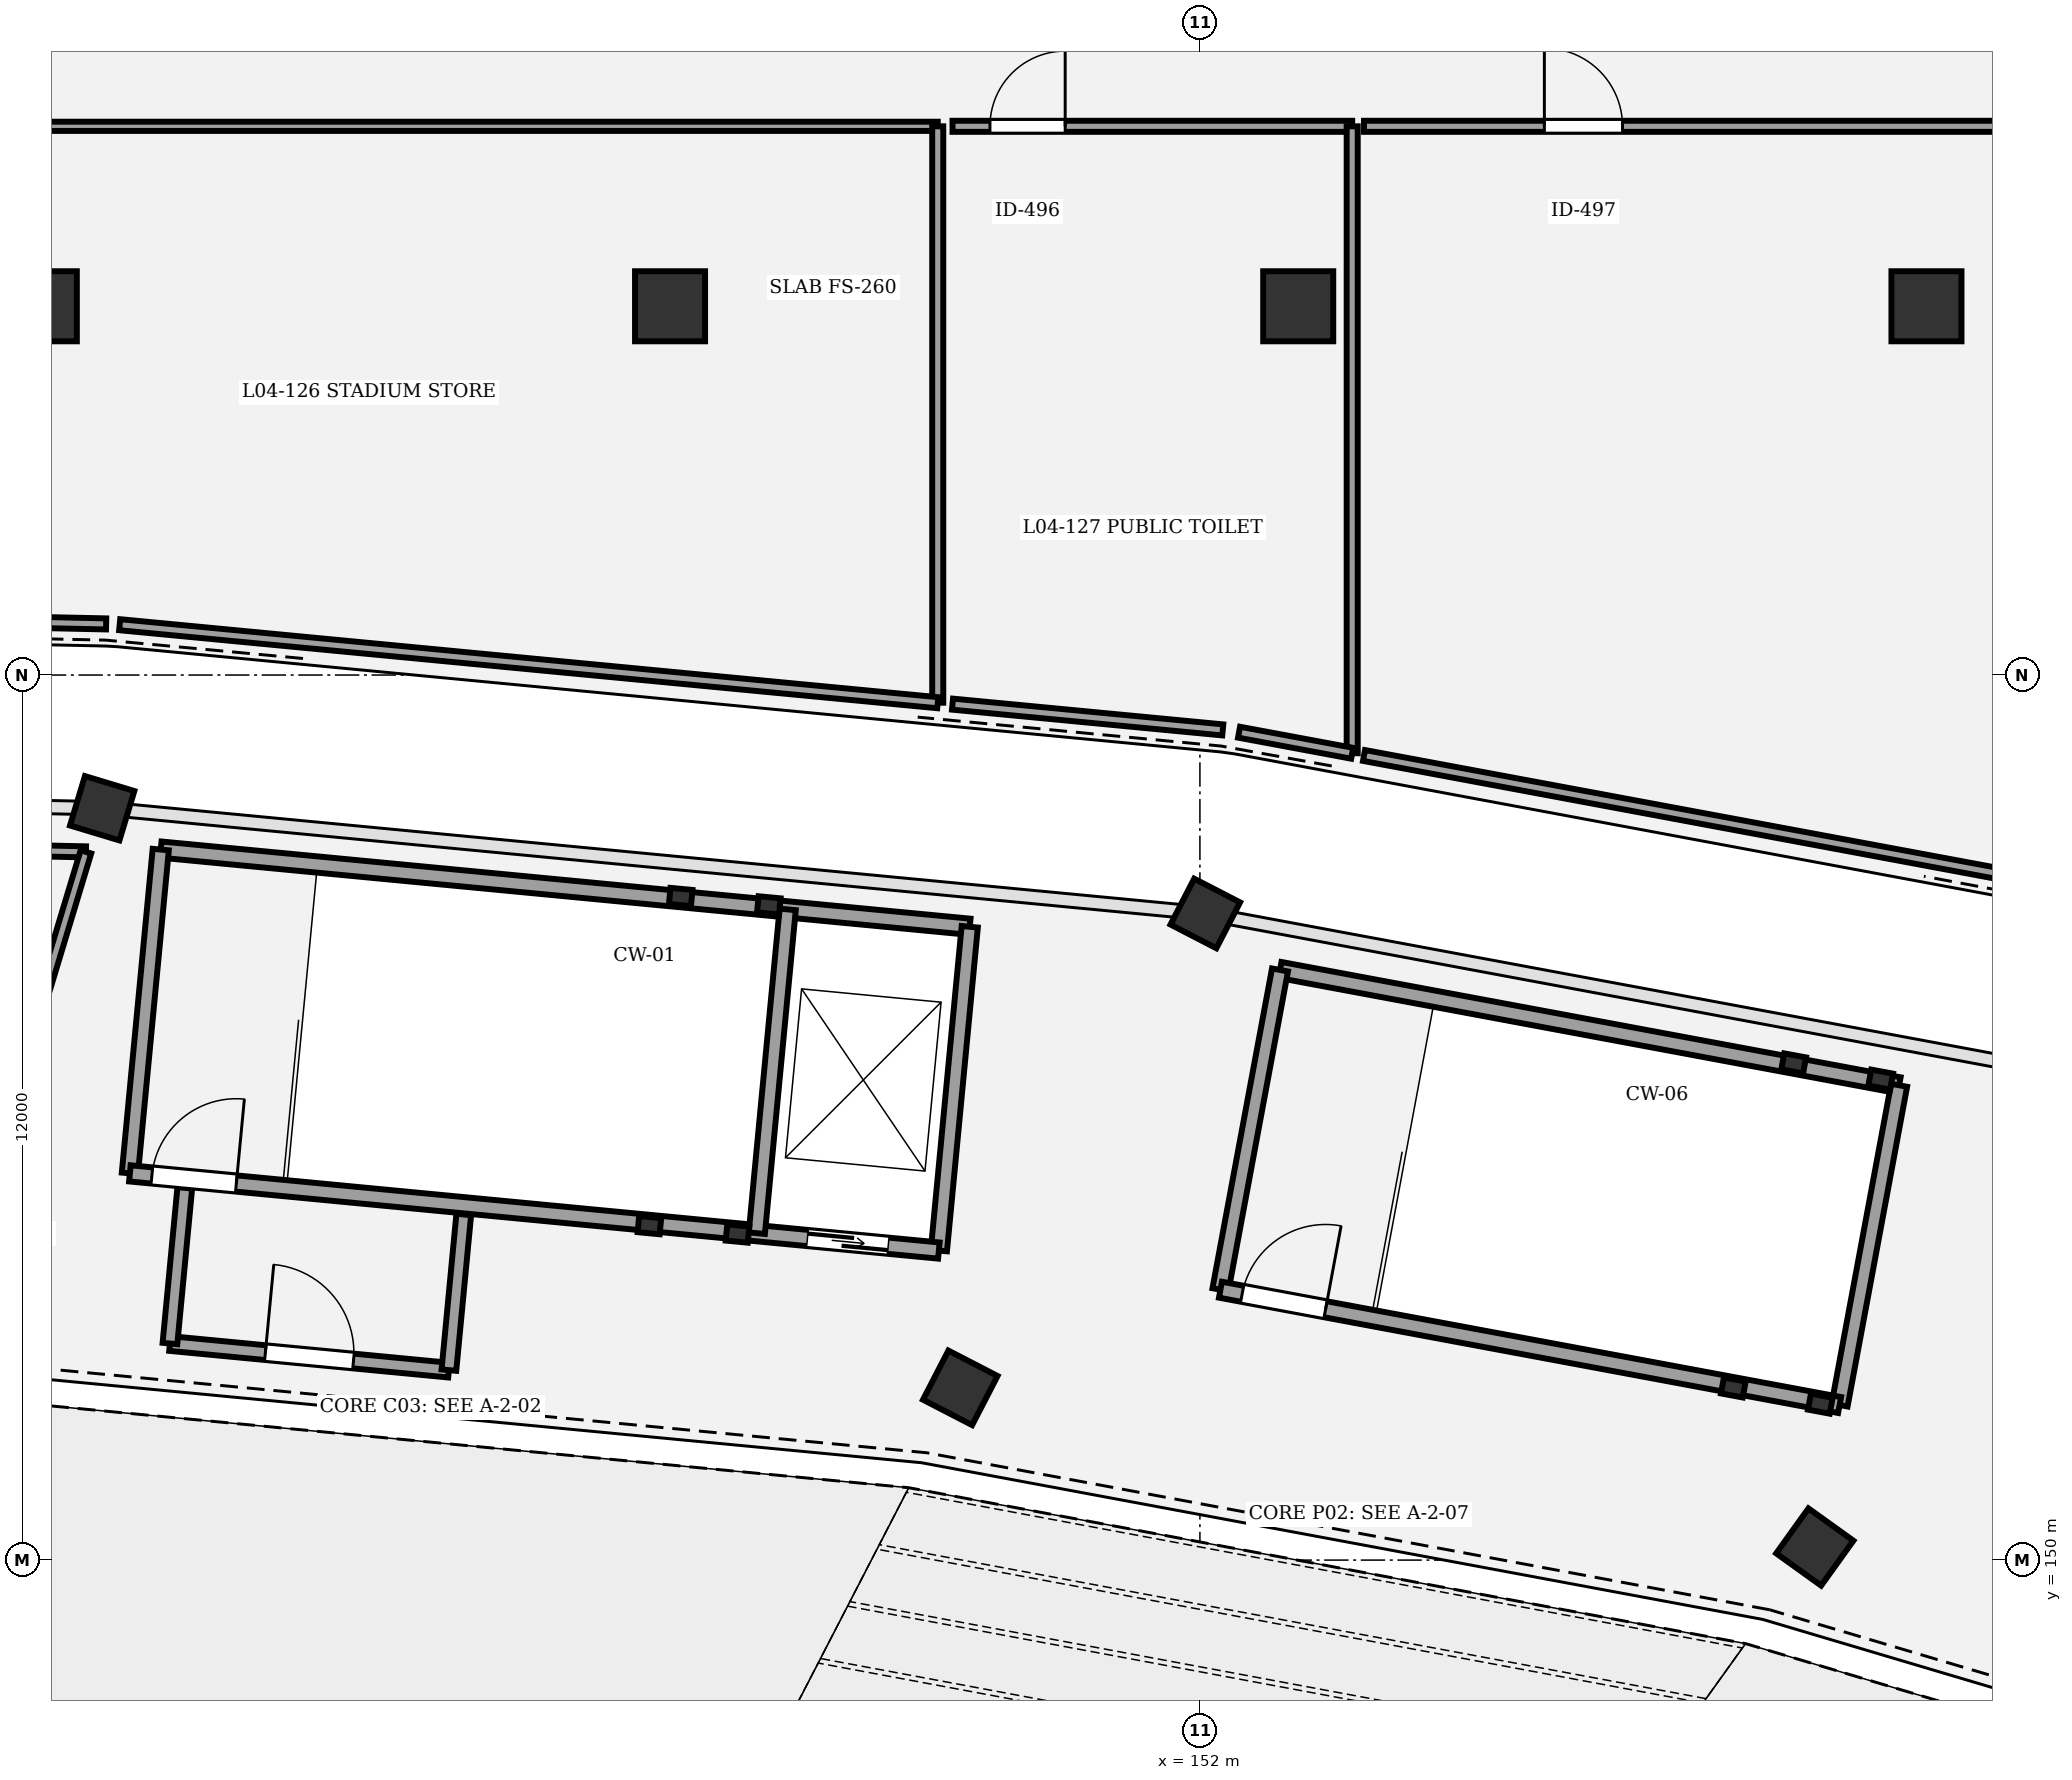
"""IFC4 building model, lengths in metres.
Left out: names, types, materials, properties, quantities, classifications, styles, units other than length and angle.
Written with IfcOpenShell. Run it as: python <this file> out.ifc"""

import sys

from ifc_helpers import new_model, si_unit, direction, frame, frame_2d, origin, origin_2d, place, context, subcontext, project, spatial, rectangle, circle, extrude, element, fill, save


model = new_model("IFC4")
c1 = context("Model", 3, precision=1e-05, world=origin(), true_north=direction((0.0, 1.0)))
c2 = subcontext(c1, "Body", "Model", "MODEL_VIEW")
j1 = project(units=[si_unit("LENGTHUNIT", "METRE"), si_unit("PLANEANGLEUNIT", "RADIAN")], contexts=[c1])
p1 = place(None, origin())
s1 = spatial("IfcSite", under=j1, at=p1, CompositionType="ELEMENT")
p2 = place(p1, origin())
s2 = spatial("IfcBuilding", under=s1, at=p2, CompositionType="ELEMENT")
p3 = place(p2, frame((0.0, 0.0, 19.2)))
s3 = spatial("IfcBuildingStorey", under=s2, at=p3, CompositionType="ELEMENT", Elevation=19.2)
for number, where, z_axis, x_axis in (
    (1, (160.338, 150.177, 0.0), (0.0, 0.0, 1.0), (0.583, 0.812, 0.0)),
    (2, (148.75, 152.335, 0.0), (0.0, 0.0, 1.0), (0.459, 0.888, 0.0)),
):
    element("IfcColumn", number, at=place(p3, frame(where, z_axis=z_axis, x_axis=x_axis)), inside=s3, PredefinedType="COLUMN", context=c2, shape_type="SweptSolid", body=[
        extrude(rectangle(XDim=0.75, YDim=0.75, at=origin_2d()), origin(), (0.0, 0.0, 1.0), 4.8),
    ])
for number, where, z_axis, x_axis in (
    (3, (152.073, 158.767, 0.0), (0.0, 0.0, 1.0), (0.459, 0.888, 0.0)),
    (4, (137.115, 160.194, 0.0), (0.0, 0.0, 1.0), (0.289, 0.957, 0.0)),
):
    element("IfcColumn", number, at=place(p3, frame(where, z_axis=z_axis, x_axis=x_axis)), inside=s3, PredefinedType="COLUMN", context=c2, shape_type="SweptSolid", body=[
        extrude(rectangle(XDim=0.7, YDim=0.7, at=origin_2d()), origin(), (0.0, 0.0, 1.0), 4.8),
    ])
for number, where, z_axis, x_axis in (
    (5, (136.296, 167.0, 0.0), (0.0, 0.0, 1.0), (1.0, 0.0, 0.0)),
    (6, (144.815, 167.0, 0.0), (0.0, 0.0, 1.0), (1.0, 0.0, 0.0)),
    (7, (153.333, 167.0, 0.0), (0.0, 0.0, 1.0), (1.0, 0.0, 0.0)),
    (8, (161.852, 167.0, 0.0), (0.0, 0.0, 1.0), (1.0, 0.0, 0.0)),
):
    element("IfcColumn", number, at=place(p3, frame(where, z_axis=z_axis, x_axis=x_axis)), inside=s3, PredefinedType="COLUMN", context=c2, shape_type="SweptSolid", body=[
        extrude(circle(Radius=0.475, at=origin_2d()), origin(), (0.0, 0.0, 1.0), 4.8),
    ])
for number, where, z_axis, x_axis in (
    (9, (144.535, 154.541, 0.0), (0.0, 0.0, 1.0), (0.995, -0.095, 0.0)),
    (10, (145.73, 154.427, 0.0), (0.0, 0.0, 1.0), (0.995, -0.095, 0.0)),
    (11, (146.154, 158.877, 0.0), (0.0, 0.0, 1.0), (0.995, -0.095, 0.0)),
    (12, (144.96, 158.991, 0.0), (0.0, 0.0, 1.0), (0.995, -0.095, 0.0)),
):
    element("IfcColumn", number, at=place(p3, frame(where, z_axis=z_axis, x_axis=x_axis)), inside=s3, PredefinedType="COLUMN", context=c2, shape_type="SweptSolid", body=[
        extrude(rectangle(XDim=0.3, YDim=0.22, at=origin_2d()), origin(), (0.0, 0.0, 1.0), 4.8),
    ])
p4 = place(p3, frame((137.909, 159.634, 0.0), z_axis=(0.0, 0.0, 1.0), x_axis=(0.99547962713, -0.094975322952, 0.0)))
e13 = element("IfcWall", 13, at=p4, inside=s3, PredefinedType="SHEAR", context=c2, shape_type="SweptSolid", body=[
    extrude(rectangle(XDim=11.02, YDim=0.22, at=frame_2d((5.51, 0.0))), origin(), (0.0, 0.0, 1.0), 4.55),
])
p5 = place(p3, frame((137.49, 155.243, 0.0), z_axis=(0.0, 0.0, 1.0), x_axis=(0.094997189401, 0.995477540684, 0.0)))
e14 = element("IfcWall", 14, at=p5, inside=s3, PredefinedType="SHEAR", context=c2, shape_type="SweptSolid", body=[
    extrude(rectangle(XDim=4.41, YDim=0.22, at=frame_2d((2.205, 0.0))), origin(), (0.0, 0.0, 1.0), 4.55),
])
p6 = place(p3, frame((148.46, 154.197, 0.0), z_axis=(0.0, 0.0, 1.0), x_axis=(0.095002424918, 0.995477041051, 0.0)))
e15 = element("IfcWall", 15, at=p6, inside=s3, PredefinedType="SHEAR", context=c2, shape_type="SweptSolid", body=[
    extrude(rectangle(XDim=4.41, YDim=0.22, at=frame_2d((2.205, 0.0))), origin(), (0.0, 0.0, 1.0), 4.55),
])
p7 = place(p3, frame((137.49, 155.243, 0.0), z_axis=(0.0, 0.0, 1.0), x_axis=(0.995481721489, -0.094953368458, 0.0)))
e16 = element("IfcWall", 16, at=p7, inside=s3, PredefinedType="SHEAR", context=c2, shape_type="SweptSolid", body=[
    extrude(rectangle(XDim=11.02, YDim=0.22, at=frame_2d((5.51, 0.0))), origin(), (0.0, 0.0, 1.0), 4.55),
])
p8 = place(p7, frame((0.3, 0.0, 0.0)))
e17 = element("IfcOpeningElement", 17, at=p8, cuts=e16, PredefinedType="OPENING", context=c2, shape_type="SweptSolid", body=[
    extrude(rectangle(XDim=1.15, YDim=2.15, at=frame_2d((0.575, 1.075))), frame((0.0, 0.12, 0.0), z_axis=(0.0, -1.0, 0.0), x_axis=(1.0, 0.0, 0.0)), (0.0, 0.0, 1.0), 0.24),
])
p9 = place(p7, frame((9.23, 0.0, 0.0)))
e18 = element("IfcOpeningElement", 18, at=p9, cuts=e16, PredefinedType="OPENING", context=c2, shape_type="SweptSolid", body=[
    extrude(rectangle(XDim=1.1, YDim=2.15, at=frame_2d((0.55, 1.075))), frame((0.0, 0.12, 0.0), z_axis=(0.0, -1.0, 0.0), x_axis=(1.0, 0.0, 0.0)), (0.0, 0.0, 1.0), 0.24),
])
p10 = place(p3, frame((145.991, 154.432, 0.0), z_axis=(0.0, 0.0, 1.0), x_axis=(0.094997189401, 0.995477540684, 0.0)))
e19 = element("IfcWall", 19, at=p10, inside=s3, PredefinedType="SHEAR", context=c2, shape_type="SweptSolid", body=[
    extrude(rectangle(XDim=4.41, YDim=0.22, at=frame_2d((2.205, 0.0))), origin(), (0.0, 0.0, 1.0), 4.55),
])
p11 = place(p3, frame((138.033, 152.937, 0.0), z_axis=(0.0, 0.0, 1.0), x_axis=(0.995481022971, -0.094960691361, 0.0)))
e20 = element("IfcWall", 20, at=p11, inside=s3, PredefinedType="PARTITIONING", context=c2, shape_type="SweptSolid", body=[
    extrude(rectangle(XDim=3.8, YDim=0.2, at=frame_2d((1.9, 0.0))), origin(), (0.0, 0.0, 1.0), 3.65),
])
p12 = place(p11, frame((1.3, 0.0, 0.0)))
e21 = element("IfcOpeningElement", 21, at=p12, cuts=e20, PredefinedType="OPENING", context=c2, shape_type="SweptSolid", body=[
    extrude(rectangle(XDim=1.2, YDim=2.18, at=frame_2d((0.6, 1.09))), frame((0.0, 0.11, 0.0), z_axis=(0.0, -1.0, 0.0), x_axis=(1.0, 0.0, 0.0)), (0.0, 0.0, 1.0), 0.22),
])
for number, where, z_axis, x_axis in (
    (22, (138.033, 152.937, 0.0), (0.0, 0.0, 1.0), (0.095, 0.995, 0.0)),
    (23, (141.816, 152.576, 0.0), (0.0, 0.0, 1.0), (0.095, 0.995, 0.0)),
):
    element("IfcWall", number, at=place(p3, frame(where, z_axis=z_axis, x_axis=x_axis)), inside=s3, PredefinedType="PARTITIONING", context=c2, shape_type="SweptSolid", body=[
        extrude(rectangle(XDim=2.12, YDim=0.2, at=frame_2d((1.06, 0.0))), origin(), (0.0, 0.0, 1.0), 3.65),
    ])
for number, where, z_axis, x_axis in (
    (24, (159.233, 152.34, 0.0), (0.0, 0.0, 1.0), (0.983, -0.183, 0.0)),
    (25, (160.413, 152.121, 0.0), (0.0, 0.0, 1.0), (0.983, -0.183, 0.0)),
    (26, (161.231, 156.515, 0.0), (0.0, 0.0, 1.0), (0.983, -0.183, 0.0)),
    (27, (160.052, 156.735, 0.0), (0.0, 0.0, 1.0), (0.983, -0.183, 0.0)),
):
    element("IfcColumn", number, at=place(p3, frame(where, z_axis=z_axis, x_axis=x_axis)), inside=s3, PredefinedType="COLUMN", context=c2, shape_type="SweptSolid", body=[
        extrude(rectangle(XDim=0.3, YDim=0.22, at=origin_2d()), origin(), (0.0, 0.0, 1.0), 4.8),
    ])
p13 = place(p3, frame((153.086, 158.001, 0.0), z_axis=(0.0, 0.0, 1.0), x_axis=(0.983097993869, -0.18308013123, 0.0)))
e28 = element("IfcWall", 28, at=p13, inside=s3, PredefinedType="SHEAR", context=c2, shape_type="SweptSolid", body=[
    extrude(rectangle(XDim=8.54, YDim=0.22, at=frame_2d((4.27, 0.0))), origin(), (0.0, 0.0, 1.0), 4.55),
])
for number, where, z_axis, x_axis in (
    (29, (152.279, 153.666, 0.0), (0.0, 0.0, 1.0), (0.183, 0.983, 0.0)),
    (30, (160.674, 152.103, 0.0), (0.0, 0.0, 1.0), (0.183, 0.983, 0.0)),
):
    element("IfcWall", number, at=place(p3, frame(where, z_axis=z_axis, x_axis=x_axis)), inside=s3, PredefinedType="SHEAR", context=c2, shape_type="SweptSolid", body=[
        extrude(rectangle(XDim=4.41, YDim=0.22, at=frame_2d((2.205, 0.0))), origin(), (0.0, 0.0, 1.0), 4.55),
    ])
p14 = place(p3, frame((152.279, 153.666, 0.0), z_axis=(0.0, 0.0, 1.0), x_axis=(0.983097993869, -0.18308013123, 0.0)))
e31 = element("IfcWall", 31, at=p14, inside=s3, PredefinedType="SHEAR", context=c2, shape_type="SweptSolid", body=[
    extrude(rectangle(XDim=8.54, YDim=0.22, at=frame_2d((4.27, 0.0))), origin(), (0.0, 0.0, 1.0), 4.55),
])
p15 = place(p14, frame((0.3, 0.0, 0.0)))
e32 = element("IfcOpeningElement", 32, at=p15, cuts=e31, PredefinedType="OPENING", context=c2, shape_type="SweptSolid", body=[
    extrude(rectangle(XDim=1.15, YDim=2.15, at=frame_2d((0.575, 1.075))), frame((0.0, 0.12, 0.0), z_axis=(0.0, -1.0, 0.0), x_axis=(1.0, 0.0, 0.0)), (0.0, 0.0, 1.0), 0.24),
])
p16 = place(p3, frame((123.5, 169.44, 0.0), z_axis=(0.0, 0.0, 1.0), x_axis=(1.0, 0.0, 0.0)))
e33 = element("IfcWall", 33, at=p16, inside=s3, PredefinedType="PARTITIONING", context=c2, shape_type="SweptSolid", body=[
    extrude(rectangle(XDim=24.945, YDim=0.125, at=frame_2d((12.473, 0.0))), origin(), (0.0, 0.0, 1.0), 3.55),
])
p17 = place(p16, frame((8.484, 0.0, 0.0)))
e34 = element("IfcOpeningElement", 34, at=p17, cuts=e33, PredefinedType="OPENING", context=c2, shape_type="SweptSolid", body=[
    extrude(rectangle(XDim=0.98, YDim=2.3, at=frame_2d((0.49, 1.15))), frame((0.0, 0.073, 0.0), z_axis=(0.0, -1.0, 0.0), x_axis=(1.0, 0.0, 0.0)), (0.0, 0.0, 1.0), 0.145),
])
p18 = place(p3, frame((148.645, 169.44, 0.0), z_axis=(0.0, 0.0, 1.0), x_axis=(1.0, 0.0, 0.0)))
e35 = element("IfcWall", 35, at=p18, inside=s3, PredefinedType="PARTITIONING", context=c2, shape_type="SweptSolid", body=[
    extrude(rectangle(XDim=5.42, YDim=0.15, at=frame_2d((2.71, 0.0))), origin(), (0.0, 0.0, 1.0), 3.55),
])
p19 = place(p18, frame((0.508, 0.0, 0.0)))
e36 = element("IfcOpeningElement", 36, at=p19, cuts=e35, PredefinedType="OPENING", context=c2, shape_type="SweptSolid", body=[
    extrude(rectangle(XDim=1.02, YDim=2.3, at=frame_2d((0.51, 1.15))), frame((0.0, 0.085, 0.0), z_axis=(0.0, -1.0, 0.0), x_axis=(1.0, 0.0, 0.0)), (0.0, 0.0, 1.0), 0.17),
])
p20 = place(p3, frame((154.225, 169.44, 0.0), z_axis=(0.0, 0.0, 1.0), x_axis=(1.0, 0.0, 0.0)))
e37 = element("IfcWall", 37, at=p20, inside=s3, PredefinedType="PARTITIONING", context=c2, shape_type="SweptSolid", body=[
    extrude(rectangle(XDim=19.415, YDim=0.15, at=frame_2d((9.708, 0.0))), origin(), (0.0, 0.0, 1.0), 3.55),
])
p21 = place(p20, frame((2.446, 0.0, 0.0)))
e38 = element("IfcOpeningElement", 38, at=p21, cuts=e37, PredefinedType="OPENING", context=c2, shape_type="SweptSolid", body=[
    extrude(rectangle(XDim=1.06, YDim=2.3, at=frame_2d((0.53, 1.15))), frame((0.0, 0.085, 0.0), z_axis=(0.0, -1.0, 0.0), x_axis=(1.0, 0.0, 0.0)), (0.0, 0.0, 1.0), 0.17),
])
p22 = place(p3, frame((115.04, 160.073, 0.0), z_axis=(0.0, 0.0, 1.0), x_axis=(0.99976837209, -0.021522132079, 0.0)))
e39 = element("IfcWall", 39, at=p22, inside=s3, PredefinedType="PARTITIONING", context=c2, shape_type="SweptSolid", body=[
    extrude(rectangle(XDim=21.859, YDim=0.15, at=frame_2d((10.93, 0.0))), origin(), (0.0, 0.0, 1.0), 3.55),
])
p23 = place(p3, frame((136.894, 159.603, 0.0), z_axis=(0.0, 0.0, 1.0), x_axis=(-0.289258185314, -0.957251117643, 0.0)))
e40 = element("IfcWall", 40, at=p23, inside=s3, PredefinedType="PARTITIONING", context=c2, shape_type="SweptSolid", body=[
    extrude(rectangle(XDim=5.111, YDim=0.15, at=frame_2d((2.555, 0.0))), origin(), (0.0, 0.0, 1.0), 3.55),
])
p24 = place(p3, frame((137.168, 162.693, 0.0), z_axis=(0.0, 0.0, 1.0), x_axis=(-0.999768230535, 0.021528706714, 0.0)))
e41 = element("IfcWall", 41, at=p24, inside=s3, PredefinedType="PARTITIONING", context=c2, shape_type="SweptSolid", body=[
    extrude(rectangle(XDim=13.722, YDim=0.15, at=frame_2d((6.861, 0.0))), origin(), (0.0, 0.0, 1.0), 3.55),
])
p25 = place(p3, frame((148.445, 169.44, 0.0), z_axis=(0.0, 0.0, 1.0), x_axis=(0.0, -1.0, 0.0)))
e42 = element("IfcWall", 42, at=p25, inside=s3, PredefinedType="PARTITIONING", context=c2, shape_type="SweptSolid", body=[
    extrude(rectangle(XDim=7.815, YDim=0.15, at=frame_2d((3.908, 0.0))), origin(), (0.0, 0.0, 1.0), 3.55),
])
p26 = place(p3, frame((148.445, 161.625, 0.0), z_axis=(0.0, 0.0, 1.0), x_axis=(-0.995483944756, 0.094930057059, 0.0)))
e43 = element("IfcWall", 43, at=p26, inside=s3, PredefinedType="PARTITIONING", context=c2, shape_type="SweptSolid", body=[
    extrude(rectangle(XDim=11.144, YDim=0.15, at=frame_2d((5.572, 0.0))), origin(), (0.0, 0.0, 1.0), 3.55),
])
p27 = place(p3, frame((152.31, 161.256, 0.0), z_axis=(0.0, 0.0, 1.0), x_axis=(-0.995481155674, 0.094959300221, 0.0)))
e44 = element("IfcWall", 44, at=p27, inside=s3, PredefinedType="PARTITIONING", context=c2, shape_type="SweptSolid", body=[
    extrude(rectangle(XDim=3.682, YDim=0.15, at=frame_2d((1.841, 0.0))), origin(), (0.0, 0.0, 1.0), 3.55),
])
p28 = place(p3, frame((154.065, 169.44, 0.0), z_axis=(0.0, 0.0, 1.0), x_axis=(0.0, -1.0, 0.0)))
e45 = element("IfcWall", 45, at=p28, inside=s3, PredefinedType="PARTITIONING", context=c2, shape_type="SweptSolid", body=[
    extrude(rectangle(XDim=8.5, YDim=0.15, at=frame_2d((4.25, 0.0))), origin(), (0.0, 0.0, 1.0), 3.55),
])
p29 = place(p3, frame((154.065, 160.939, 0.0), z_axis=(0.0, 0.0, 1.0), x_axis=(-0.983110419565, 0.183013395528, 0.0)))
e46 = element("IfcWall", 46, at=p29, inside=s3, PredefinedType="PARTITIONING", context=c2, shape_type="SweptSolid", body=[
    extrude(rectangle(XDim=1.561, YDim=0.15, at=frame_2d((0.78, 0.0))), origin(), (0.0, 0.0, 1.0), 3.55),
])
p30 = place(p3, frame((165.259, 158.854, 0.0), z_axis=(0.0, 0.0, 1.0), x_axis=(-0.983091639371, 0.183114250127, 0.0)))
e47 = element("IfcWall", 47, at=p30, inside=s3, PredefinedType="PARTITIONING", context=c2, shape_type="SweptSolid", body=[
    extrude(rectangle(XDim=11.223, YDim=0.15, at=frame_2d((5.612, 0.0))), origin(), (0.0, 0.0, 1.0), 3.55),
])
p31 = place(p8, origin())
e48 = element("IfcDoor", 48, at=p31, inside=s3, OperationType="SINGLE_SWING_RIGHT", PredefinedType="DOOR", context=c2, shape_type="SweptSolid", body=[
    extrude(rectangle(XDim=1.15, YDim=2.15, at=frame_2d((0.575, 1.075))), frame((0.0, 0.025, 0.0), z_axis=(0.0, -1.0, 0.0), x_axis=(1.0, 0.0, 0.0)), (0.0, 0.0, 1.0), 0.05),
])
fill(e17, e48)
p32 = place(p9, origin())
e49 = element("IfcDoor", 49, at=p32, inside=s3, OperationType="DOUBLE_DOOR_SLIDING", PredefinedType="DOOR", context=c2, shape_type="SweptSolid", body=[
    extrude(rectangle(XDim=1.1, YDim=2.15, at=frame_2d((0.55, 1.075))), frame((0.0, 0.025, 0.0), z_axis=(0.0, -1.0, 0.0), x_axis=(1.0, 0.0, 0.0)), (0.0, 0.0, 1.0), 0.05),
])
fill(e18, e49)
p33 = place(p12, origin())
e50 = element("IfcDoor", 50, at=p33, inside=s3, OperationType="SINGLE_SWING_LEFT", PredefinedType="DOOR", context=c2, shape_type="SweptSolid", body=[
    extrude(rectangle(XDim=1.2, YDim=2.18, at=frame_2d((0.6, 1.09))), frame((0.0, 0.025, 0.0), z_axis=(0.0, -1.0, 0.0), x_axis=(1.0, 0.0, 0.0)), (0.0, 0.0, 1.0), 0.05),
])
fill(e21, e50)
p34 = place(p15, origin())
e51 = element("IfcDoor", 51, at=p34, inside=s3, OperationType="SINGLE_SWING_RIGHT", PredefinedType="DOOR", context=c2, shape_type="SweptSolid", body=[
    extrude(rectangle(XDim=1.15, YDim=2.15, at=frame_2d((0.575, 1.075))), frame((0.0, 0.025, 0.0), z_axis=(0.0, -1.0, 0.0), x_axis=(1.0, 0.0, 0.0)), (0.0, 0.0, 1.0), 0.05),
])
fill(e32, e51)
p35 = place(p19, origin())
e52 = element("IfcDoor", 52, at=p35, inside=s3, OperationType="SINGLE_SWING_RIGHT", PredefinedType="DOOR", context=c2, shape_type="SweptSolid", body=[
    extrude(rectangle(XDim=1.02, YDim=2.3, at=frame_2d((0.51, 1.15))), frame((0.0, 0.025, 0.0), z_axis=(0.0, -1.0, 0.0), x_axis=(1.0, 0.0, 0.0)), (0.0, 0.0, 1.0), 0.05),
])
fill(e36, e52)
p36 = place(p21, origin())
e53 = element("IfcDoor", 53, at=p36, inside=s3, OperationType="SINGLE_SWING_LEFT", PredefinedType="DOOR", context=c2, shape_type="SweptSolid", body=[
    extrude(rectangle(XDim=1.06, YDim=2.3, at=frame_2d((0.53, 1.15))), frame((0.0, 0.025, 0.0), z_axis=(0.0, -1.0, 0.0), x_axis=(1.0, 0.0, 0.0)), (0.0, 0.0, 1.0), 0.05),
])
fill(e38, e53)
save(model, sys.argv[1])
